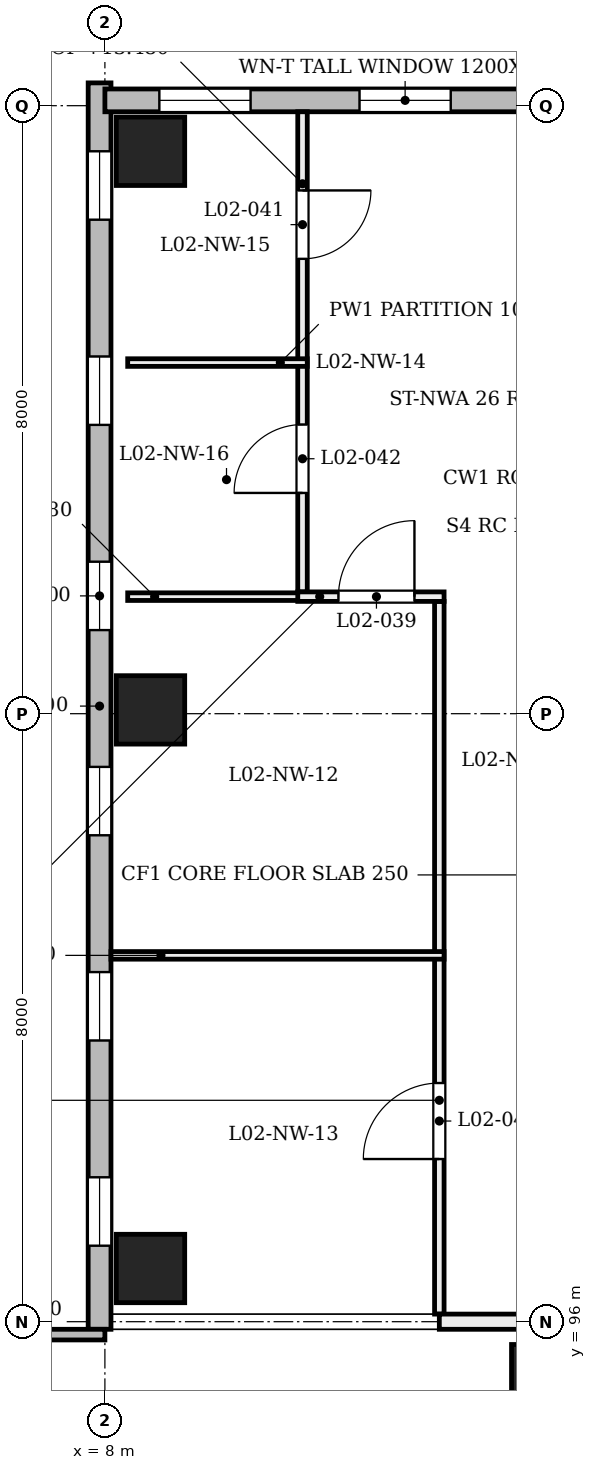
"""IFC4 building model, lengths in metres.
Left out: names, types, materials, properties, quantities, classifications, styles, units other than length and angle.
Written with IfcOpenShell. Run it as: python <this file> out.ifc"""

import sys

from ifc_helpers import new_model, si_unit, direction, frame, frame_2d, origin, origin_2d, place, context, subcontext, project, spatial, rectangle, extrude, element, fill, save


model = new_model("IFC4")
c1 = context("Model", 3, precision=1e-05, world=origin(), true_north=direction((0.0, 1.0)))
c2 = subcontext(c1, "Body", "Model", "MODEL_VIEW")
j1 = project(units=[si_unit("LENGTHUNIT", "METRE"), si_unit("PLANEANGLEUNIT", "RADIAN")], contexts=[c1])
p1 = place(None, origin())
s1 = spatial("IfcSite", under=j1, at=p1, CompositionType="ELEMENT")
p2 = place(p1, origin())
s2 = spatial("IfcBuilding", under=s1, at=p2, CompositionType="ELEMENT")
p3 = place(p2, frame((0.0, 0.0, 9.6)))
s3 = spatial("IfcBuildingStorey", under=s2, at=p3, CompositionType="ELEMENT", Elevation=9.6)
for number, where, z_axis, x_axis in (
    (1, (8.6, 96.7, 0.0), (0.0, 0.0, 1.0), (1.0, 0.0, 0.0)),
    (2, (8.6, 104.05, 0.0), (0.0, 0.0, 1.0), (1.0, 0.0, 0.0)),
    (3, (8.6, 111.4, 0.0), (0.0, 0.0, 1.0), (1.0, 0.0, 0.0)),
):
    element("IfcColumn", number, at=place(p3, frame(where, z_axis=z_axis, x_axis=x_axis)), inside=s3, PredefinedType="COLUMN", context=c2, shape_type="SweptSolid", body=[
        extrude(rectangle(XDim=0.9, YDim=0.9, at=origin_2d()), origin(), (0.0, 0.0, 1.0), 4.8),
    ])
p4 = place(p3, frame((14.0, 95.3, 0.0), z_axis=(-0.203962208122, 0.0, 0.978978762618), x_axis=(0.0, -1.0, 0.0)))
e4 = element("IfcColumn", 4, at=p4, inside=s3, PredefinedType="COLUMN", context=c2, shape_type="SweptSolid", body=[
    extrude(rectangle(XDim=0.8, YDim=0.8, at=origin_2d()), origin(), (0.0, 0.0, 1.0), 4.903),
])
p5 = place(p3, frame((7.93, 95.9, 0.0), z_axis=(0.0, 0.0, 1.0), x_axis=(0.0, 1.0, 0.0)))
e5 = element("IfcWall", 5, at=p5, inside=s3, PredefinedType="SOLIDWALL", context=c2, shape_type="SweptSolid", body=[
    extrude(rectangle(XDim=16.4, YDim=0.3, at=frame_2d((8.2, 0.0))), origin(), (0.0, 0.0, 1.0), 3.9),
])
p6 = place(p5, frame((1.1, 0.0, 0.75)))
e6 = element("IfcOpeningElement", 6, at=p6, cuts=e5, PredefinedType="OPENING", context=c2, shape_type="SweptSolid", body=[
    extrude(rectangle(XDim=0.9, YDim=3.1, at=frame_2d((0.45, 1.55))), frame((0.0, 0.16, 0.0), z_axis=(0.0, -1.0, 0.0), x_axis=(1.0, 0.0, 0.0)), (0.0, 0.0, 1.0), 0.32),
])
p7 = place(p5, frame((3.8, 0.0, 0.75)))
e7 = element("IfcOpeningElement", 7, at=p7, cuts=e5, PredefinedType="OPENING", context=c2, shape_type="SweptSolid", body=[
    extrude(rectangle(XDim=0.9, YDim=3.1, at=frame_2d((0.45, 1.55))), frame((0.0, 0.16, 0.0), z_axis=(0.0, -1.0, 0.0), x_axis=(1.0, 0.0, 0.0)), (0.0, 0.0, 1.0), 0.32),
])
p8 = place(p5, frame((6.5, 0.0, 0.75)))
e8 = element("IfcOpeningElement", 8, at=p8, cuts=e5, PredefinedType="OPENING", context=c2, shape_type="SweptSolid", body=[
    extrude(rectangle(XDim=0.9, YDim=3.1, at=frame_2d((0.45, 1.55))), frame((0.0, 0.16, 0.0), z_axis=(0.0, -1.0, 0.0), x_axis=(1.0, 0.0, 0.0)), (0.0, 0.0, 1.0), 0.32),
])
p9 = place(p5, frame((9.2, 0.0, 0.75)))
e9 = element("IfcOpeningElement", 9, at=p9, cuts=e5, PredefinedType="OPENING", context=c2, shape_type="SweptSolid", body=[
    extrude(rectangle(XDim=0.9, YDim=3.1, at=frame_2d((0.45, 1.55))), frame((0.0, 0.16, 0.0), z_axis=(0.0, -1.0, 0.0), x_axis=(1.0, 0.0, 0.0)), (0.0, 0.0, 1.0), 0.32),
])
p10 = place(p5, frame((11.9, 0.0, 0.75)))
e10 = element("IfcOpeningElement", 10, at=p10, cuts=e5, PredefinedType="OPENING", context=c2, shape_type="SweptSolid", body=[
    extrude(rectangle(XDim=0.9, YDim=3.1, at=frame_2d((0.45, 1.55))), frame((0.0, 0.16, 0.0), z_axis=(0.0, -1.0, 0.0), x_axis=(1.0, 0.0, 0.0)), (0.0, 0.0, 1.0), 0.32),
])
p11 = place(p5, frame((14.6, 0.0, 0.75)))
e11 = element("IfcOpeningElement", 11, at=p11, cuts=e5, PredefinedType="OPENING", context=c2, shape_type="SweptSolid", body=[
    extrude(rectangle(XDim=0.9, YDim=3.1, at=frame_2d((0.45, 1.55))), frame((0.0, 0.16, 0.0), z_axis=(0.0, -1.0, 0.0), x_axis=(1.0, 0.0, 0.0)), (0.0, 0.0, 1.0), 0.32),
])
p12 = place(p3, frame((8.0, 112.07, 0.0), z_axis=(0.0, 0.0, 1.0), x_axis=(1.0, 0.0, 0.0)))
e12 = element("IfcWall", 12, at=p12, inside=s3, PredefinedType="SOLIDWALL", context=c2, shape_type="SweptSolid", body=[
    extrude(rectangle(XDim=7.9, YDim=0.3, at=frame_2d((3.95, 0.0))), origin(), (0.0, 0.0, 1.0), 3.9),
])
p13 = place(p12, frame((0.717, 0.0, 0.75)))
e13 = element("IfcOpeningElement", 13, at=p13, cuts=e12, PredefinedType="OPENING", context=c2, shape_type="SweptSolid", body=[
    extrude(rectangle(XDim=1.2, YDim=3.1, at=frame_2d((0.6, 1.55))), frame((0.0, 0.16, 0.0), z_axis=(0.0, -1.0, 0.0), x_axis=(1.0, 0.0, 0.0)), (0.0, 0.0, 1.0), 0.32),
])
p14 = place(p12, frame((3.35, 0.0, 0.75)))
e14 = element("IfcOpeningElement", 14, at=p14, cuts=e12, PredefinedType="OPENING", context=c2, shape_type="SweptSolid", body=[
    extrude(rectangle(XDim=1.2, YDim=3.1, at=frame_2d((0.6, 1.55))), frame((0.0, 0.16, 0.0), z_axis=(0.0, -1.0, 0.0), x_axis=(1.0, 0.0, 0.0)), (0.0, 0.0, 1.0), 0.32),
])
p15 = place(p12, frame((5.983, 0.0, 0.75)))
e15 = element("IfcOpeningElement", 15, at=p15, cuts=e12, PredefinedType="OPENING", context=c2, shape_type="SweptSolid", body=[
    extrude(rectangle(XDim=1.2, YDim=3.1, at=frame_2d((0.6, 1.55))), frame((0.0, 0.16, 0.0), z_axis=(0.0, -1.0, 0.0), x_axis=(1.0, 0.0, 0.0)), (0.0, 0.0, 1.0), 0.32),
])
p16 = place(p3, frame((6.0, 95.83, 0.0), z_axis=(0.0, 0.0, 1.0), x_axis=(1.0, 0.0, 0.0)))
e16 = element("IfcWall", 16, at=p16, inside=s3, PredefinedType="SOLIDWALL", context=c2, shape_type="SweptSolid", body=[
    extrude(rectangle(XDim=2.0, YDim=0.14, at=frame_2d((1.0, 0.0))), origin(), (0.0, 0.0, 1.0), 3.9),
])
p17 = place(p3, frame((12.4, 96.1, 0.0), z_axis=(0.0, 0.0, 1.0), x_axis=(0.0, 1.0, 0.0)))
e17 = element("IfcWall", 17, at=p17, inside=s3, PredefinedType="PARTITIONING", context=c2, shape_type="SweptSolid", body=[
    extrude(rectangle(XDim=9.377, YDim=0.125, at=frame_2d((4.688, 0.0))), origin(), (0.0, 0.0, 1.0), 3.88),
])
p18 = place(p17, frame((2.04, 0.0, 0.0)))
e18 = element("IfcOpeningElement", 18, at=p18, cuts=e17, PredefinedType="OPENING", context=c2, shape_type="SweptSolid", body=[
    extrude(rectangle(XDim=1.0, YDim=2.1, at=frame_2d((0.5, 1.05))), frame((0.0, 0.073, 0.0), z_axis=(0.0, -1.0, 0.0), x_axis=(1.0, 0.0, 0.0)), (0.0, 0.0, 1.0), 0.145),
])
p19 = place(p3, frame((10.6, 105.602, 0.0), z_axis=(0.0, 0.0, 1.0), x_axis=(0.0, 1.0, 0.0)))
e19 = element("IfcWall", 19, at=p19, inside=s3, PredefinedType="PARTITIONING", context=c2, shape_type="SweptSolid", body=[
    extrude(rectangle(XDim=6.318, YDim=0.125, at=frame_2d((3.159, 0.0))), origin(), (0.0, 0.0, 1.0), 3.88),
])
p20 = place(p19, frame((4.383, 0.0, 0.0)))
e20 = element("IfcOpeningElement", 20, at=p20, cuts=e19, PredefinedType="OPENING", context=c2, shape_type="SweptSolid", body=[
    extrude(rectangle(XDim=0.9, YDim=2.1, at=frame_2d((0.45, 1.05))), frame((0.0, 0.073, 0.0), z_axis=(0.0, -1.0, 0.0), x_axis=(1.0, 0.0, 0.0)), (0.0, 0.0, 1.0), 0.145),
])
p21 = place(p19, frame((1.302, 0.0, 0.0)))
e21 = element("IfcOpeningElement", 21, at=p21, cuts=e19, PredefinedType="OPENING", context=c2, shape_type="SweptSolid", body=[
    extrude(rectangle(XDim=0.9, YDim=2.1, at=frame_2d((0.45, 1.05))), frame((0.0, 0.073, 0.0), z_axis=(0.0, -1.0, 0.0), x_axis=(1.0, 0.0, 0.0)), (0.0, 0.0, 1.0), 0.145),
])
p22 = place(p3, frame((8.08, 100.82, 0.0), z_axis=(0.0, 0.0, 1.0), x_axis=(1.0, 0.0, 0.0)))
e22 = element("IfcWall", 22, at=p22, inside=s3, PredefinedType="PARTITIONING", context=c2, shape_type="SweptSolid", body=[
    extrude(rectangle(XDim=4.382, YDim=0.1, at=frame_2d((2.191, 0.0))), origin(), (0.0, 0.0, 1.0), 3.88),
])
p23 = place(p3, frame((8.3, 105.54, 0.0), z_axis=(0.0, 0.0, 1.0), x_axis=(1.0, 0.0, 0.0)))
e23 = element("IfcWall", 23, at=p23, inside=s3, PredefinedType="PARTITIONING", context=c2, shape_type="SweptSolid", body=[
    extrude(rectangle(XDim=2.363, YDim=0.1, at=frame_2d((1.181, 0.0))), origin(), (0.0, 0.0, 1.0), 3.98),
])
p24 = place(p3, frame((10.538, 105.54, 0.0), z_axis=(0.0, 0.0, 1.0), x_axis=(1.0, 0.0, 0.0)))
e24 = element("IfcWall", 24, at=p24, inside=s3, PredefinedType="PARTITIONING", context=c2, shape_type="SweptSolid", body=[
    extrude(rectangle(XDim=1.925, YDim=0.125, at=frame_2d((0.962, 0.0))), origin(), (0.0, 0.0, 1.0), 4.56),
])
p25 = place(p24, frame((0.535, 0.0, 0.0)))
e25 = element("IfcOpeningElement", 25, at=p25, cuts=e24, PredefinedType="OPENING", context=c2, shape_type="SweptSolid", body=[
    extrude(rectangle(XDim=1.0, YDim=2.1, at=frame_2d((0.5, 1.05))), frame((0.0, 0.073, 0.0), z_axis=(0.0, -1.0, 0.0), x_axis=(1.0, 0.0, 0.0)), (0.0, 0.0, 1.0), 0.145),
])
p26 = place(p3, frame((8.3, 108.62, 0.0), z_axis=(0.0, 0.0, 1.0), x_axis=(1.0, 0.0, 0.0)))
e26 = element("IfcWall", 26, at=p26, inside=s3, PredefinedType="PARTITIONING", context=c2, shape_type="SweptSolid", body=[
    extrude(rectangle(XDim=2.363, YDim=0.1, at=frame_2d((1.181, 0.0))), origin(), (0.0, 0.0, 1.0), 3.98),
])
p27 = place(p3, frame((12.4, 96.0, 0.0), z_axis=(0.0, 0.0, 1.0), x_axis=(1.0, 0.0, 0.0)))
e27 = element("IfcWall", 27, at=p27, inside=s3, PredefinedType="PARTITIONING", context=c2, shape_type="SweptSolid", body=[
    extrude(rectangle(XDim=3.6, YDim=0.2, at=frame_2d((1.8, 0.0))), origin(), (0.0, 0.0, 1.0), 3.88),
])
p28 = place(p27, frame((1.8, 0.0, 0.0)))
e28 = element("IfcOpeningElement", 28, at=p28, cuts=e27, PredefinedType="OPENING", context=c2, shape_type="SweptSolid", body=[
    extrude(rectangle(XDim=0.9, YDim=2.1, at=frame_2d((0.45, 1.05))), frame((0.0, 0.11, 0.0), z_axis=(0.0, -1.0, 0.0), x_axis=(1.0, 0.0, 0.0)), (0.0, 0.0, 1.0), 0.22),
])
p29 = place(p6, origin())
e29 = element("IfcWindow", 29, at=p29, inside=s3, PartitioningType="SINGLE_PANEL", PredefinedType="WINDOW", context=c2, shape_type="SweptSolid", body=[
    extrude(rectangle(XDim=0.9, YDim=3.1, at=frame_2d((0.45, 1.55))), frame((0.0, 0.03, 0.0), z_axis=(0.0, -1.0, 0.0), x_axis=(1.0, 0.0, 0.0)), (0.0, 0.0, 1.0), 0.06),
])
fill(e6, e29)
p30 = place(p7, origin())
e30 = element("IfcWindow", 30, at=p30, inside=s3, PartitioningType="SINGLE_PANEL", PredefinedType="WINDOW", context=c2, shape_type="SweptSolid", body=[
    extrude(rectangle(XDim=0.9, YDim=3.1, at=frame_2d((0.45, 1.55))), frame((0.0, 0.03, 0.0), z_axis=(0.0, -1.0, 0.0), x_axis=(1.0, 0.0, 0.0)), (0.0, 0.0, 1.0), 0.06),
])
fill(e7, e30)
p31 = place(p8, origin())
e31 = element("IfcWindow", 31, at=p31, inside=s3, PartitioningType="SINGLE_PANEL", PredefinedType="WINDOW", context=c2, shape_type="SweptSolid", body=[
    extrude(rectangle(XDim=0.9, YDim=3.1, at=frame_2d((0.45, 1.55))), frame((0.0, 0.03, 0.0), z_axis=(0.0, -1.0, 0.0), x_axis=(1.0, 0.0, 0.0)), (0.0, 0.0, 1.0), 0.06),
])
fill(e8, e31)
p32 = place(p9, origin())
e32 = element("IfcWindow", 32, at=p32, inside=s3, PartitioningType="SINGLE_PANEL", PredefinedType="WINDOW", context=c2, shape_type="SweptSolid", body=[
    extrude(rectangle(XDim=0.9, YDim=3.1, at=frame_2d((0.45, 1.55))), frame((0.0, 0.03, 0.0), z_axis=(0.0, -1.0, 0.0), x_axis=(1.0, 0.0, 0.0)), (0.0, 0.0, 1.0), 0.06),
])
fill(e9, e32)
p33 = place(p10, origin())
e33 = element("IfcWindow", 33, at=p33, inside=s3, PartitioningType="SINGLE_PANEL", PredefinedType="WINDOW", context=c2, shape_type="SweptSolid", body=[
    extrude(rectangle(XDim=0.9, YDim=3.1, at=frame_2d((0.45, 1.55))), frame((0.0, 0.03, 0.0), z_axis=(0.0, -1.0, 0.0), x_axis=(1.0, 0.0, 0.0)), (0.0, 0.0, 1.0), 0.06),
])
fill(e10, e33)
p34 = place(p11, origin())
e34 = element("IfcWindow", 34, at=p34, inside=s3, PartitioningType="SINGLE_PANEL", PredefinedType="WINDOW", context=c2, shape_type="SweptSolid", body=[
    extrude(rectangle(XDim=0.9, YDim=3.1, at=frame_2d((0.45, 1.55))), frame((0.0, 0.03, 0.0), z_axis=(0.0, -1.0, 0.0), x_axis=(1.0, 0.0, 0.0)), (0.0, 0.0, 1.0), 0.06),
])
fill(e11, e34)
p35 = place(p13, origin())
e35 = element("IfcWindow", 35, at=p35, inside=s3, PartitioningType="SINGLE_PANEL", PredefinedType="WINDOW", context=c2, shape_type="SweptSolid", body=[
    extrude(rectangle(XDim=1.2, YDim=3.1, at=frame_2d((0.6, 1.55))), frame((0.0, 0.03, 0.0), z_axis=(0.0, -1.0, 0.0), x_axis=(1.0, 0.0, 0.0)), (0.0, 0.0, 1.0), 0.06),
])
fill(e13, e35)
p36 = place(p14, origin())
e36 = element("IfcWindow", 36, at=p36, inside=s3, PartitioningType="SINGLE_PANEL", PredefinedType="WINDOW", context=c2, shape_type="SweptSolid", body=[
    extrude(rectangle(XDim=1.2, YDim=3.1, at=frame_2d((0.6, 1.55))), frame((0.0, 0.03, 0.0), z_axis=(0.0, -1.0, 0.0), x_axis=(1.0, 0.0, 0.0)), (0.0, 0.0, 1.0), 0.06),
])
fill(e14, e36)
p37 = place(p25, frame((1.0, 0.0, 0.0), z_axis=(0.0, 0.0, 1.0), x_axis=(-1.0, 0.0, 0.0)))
e37 = element("IfcDoor", 37, at=p37, inside=s3, OperationType="SINGLE_SWING_RIGHT", PredefinedType="DOOR", context=c2, shape_type="SweptSolid", body=[
    extrude(rectangle(XDim=1.0, YDim=2.1, at=frame_2d((0.5, 1.05))), frame((0.0, 0.025, 0.0), z_axis=(0.0, -1.0, 0.0), x_axis=(1.0, 0.0, 0.0)), (0.0, 0.0, 1.0), 0.05),
])
fill(e25, e37)
p38 = place(p18, origin())
e38 = element("IfcDoor", 38, at=p38, inside=s3, OperationType="SINGLE_SWING_LEFT", PredefinedType="DOOR", context=c2, shape_type="SweptSolid", body=[
    extrude(rectangle(XDim=1.0, YDim=2.1, at=frame_2d((0.5, 1.05))), frame((0.0, 0.025, 0.0), z_axis=(0.0, -1.0, 0.0), x_axis=(1.0, 0.0, 0.0)), (0.0, 0.0, 1.0), 0.05),
])
fill(e18, e38)
p39 = place(p20, origin())
e39 = element("IfcDoor", 39, at=p39, inside=s3, OperationType="SINGLE_SWING_RIGHT", PredefinedType="DOOR", context=c2, shape_type="SweptSolid", body=[
    extrude(rectangle(XDim=0.9, YDim=2.1, at=frame_2d((0.45, 1.05))), frame((0.0, 0.025, 0.0), z_axis=(0.0, -1.0, 0.0), x_axis=(1.0, 0.0, 0.0)), (0.0, 0.0, 1.0), 0.05),
])
fill(e20, e39)
p40 = place(p21, origin())
e40 = element("IfcDoor", 40, at=p40, inside=s3, OperationType="SINGLE_SWING_LEFT", PredefinedType="DOOR", context=c2, shape_type="SweptSolid", body=[
    extrude(rectangle(XDim=0.9, YDim=2.1, at=frame_2d((0.45, 1.05))), frame((0.0, 0.025, 0.0), z_axis=(0.0, -1.0, 0.0), x_axis=(1.0, 0.0, 0.0)), (0.0, 0.0, 1.0), 0.05),
])
fill(e21, e40)
save(model, sys.argv[1])
